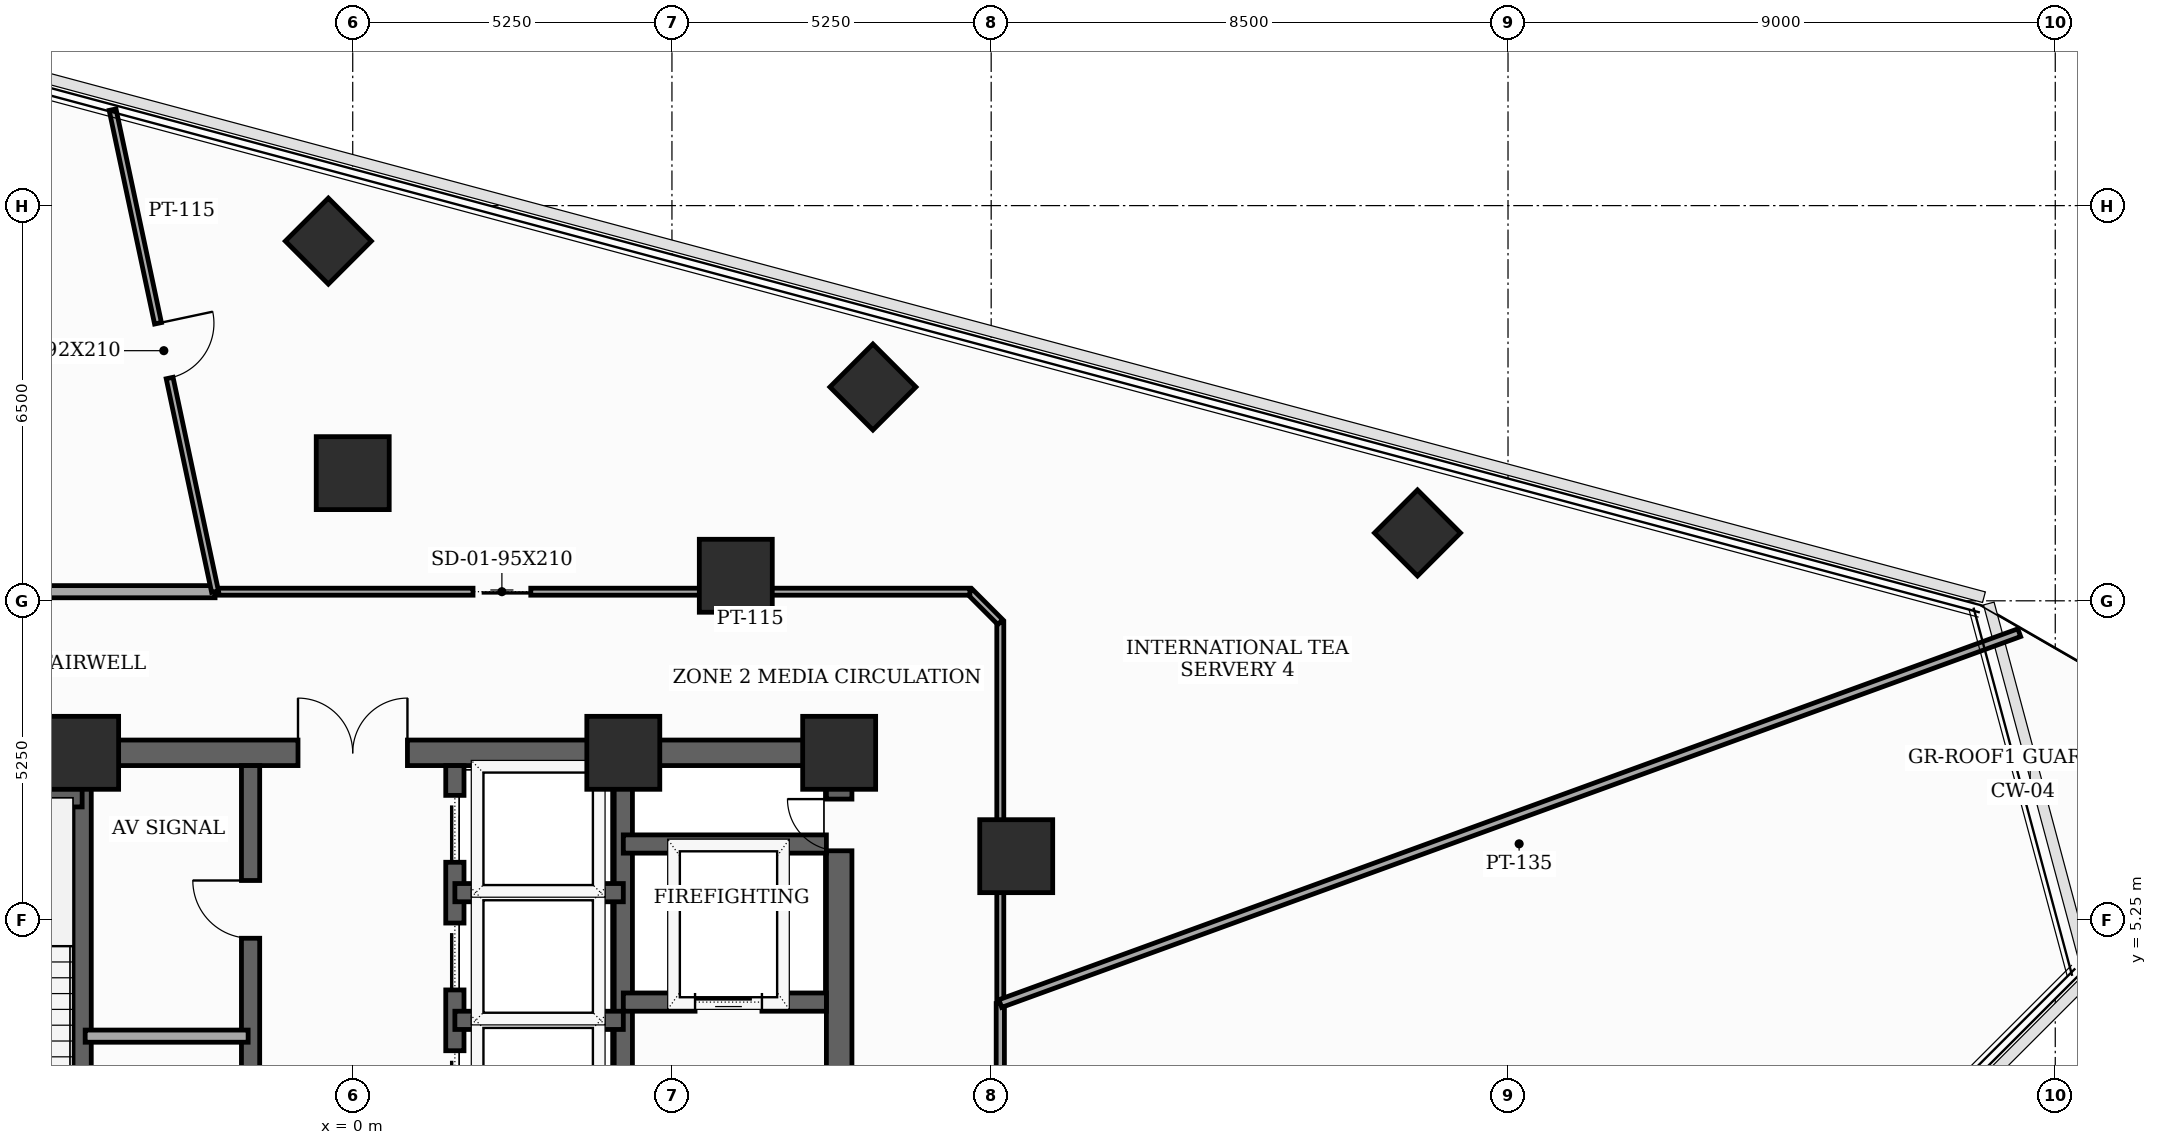
"""IFC4 building model, lengths in metres.
Left out: names, types, materials, properties, quantities, classifications, styles, units other than length and angle.
Written with IfcOpenShell. Run it as: python <this file> out.ifc"""

import sys

from ifc_helpers import new_model, si_unit, direction, frame, frame_2d, origin, origin_2d, place, context, subcontext, project, spatial, rectangle, extrude, element, fill, save


model = new_model("IFC4")
c1 = context("Model", 3, precision=1e-05, world=origin(), true_north=direction((0.0, 1.0)))
c2 = subcontext(c1, "Body", "Model", "MODEL_VIEW")
j1 = project(units=[si_unit("LENGTHUNIT", "METRE"), si_unit("PLANEANGLEUNIT", "RADIAN")], contexts=[c1])
p1 = place(None, origin())
s1 = spatial("IfcSite", under=j1, at=p1, CompositionType="ELEMENT")
p2 = place(p1, origin())
s2 = spatial("IfcBuilding", under=s1, at=p2, CompositionType="ELEMENT")
p3 = place(p2, frame((0.0, 0.0, 202.7)))
s3 = spatial("IfcBuildingStorey", under=s2, at=p3, CompositionType="ELEMENT", Elevation=202.7)
for number, where, z_axis, x_axis in (
    (1, (8.0, 8.0, 0.0), (0.0, 0.0, 1.0), (1.0, 0.0, 0.0)),
    (2, (4.45, 8.0, 0.0), (0.0, 0.0, 1.0), (1.0, 0.0, 0.0)),
    (3, (-4.45, 8.0, 0.0), (0.0, 0.0, 1.0), (1.0, 0.0, 0.0)),
    (4, (10.912, 6.3, 0.0), (0.0, 0.0, 1.0), (1.0, 0.0, 0.0)),
    (5, (6.3, 10.912, 0.0), (0.0, 0.0, 1.0), (1.0, 0.0, 0.0)),
    (6, (0.0, 12.6, 0.0), (0.0, 0.0, 1.0), (1.0, 0.0, 0.0)),
):
    element("IfcColumn", number, at=place(p3, frame(where, z_axis=z_axis, x_axis=x_axis)), inside=s3, PredefinedType="COLUMN", context=c2, shape_type="SweptSolid", body=[
        extrude(rectangle(XDim=1.2, YDim=1.2, at=origin_2d()), origin(), (0.0, 0.0, 1.0), 3.7),
    ])
for number, where, z_axis, x_axis in (
    (7, (17.511, 11.616, 0.0), (0.0, 0.0, 1.0), (0.707, 0.707, 0.0)),
    (8, (8.555, 14.016, 0.0), (0.0, 0.0, 1.0), (0.707, 0.707, 0.0)),
    (9, (-0.401, 16.416, 0.0), (0.0, 0.0, 1.0), (0.707, 0.707, 0.0)),
):
    element("IfcColumn", number, at=place(p3, frame(where, z_axis=z_axis, x_axis=x_axis)), inside=s3, PredefinedType="COLUMN", context=c2, shape_type="SweptSolid", body=[
        extrude(rectangle(XDim=1.0, YDim=1.0, at=origin_2d()), origin(), (0.0, 0.0, 1.0), 3.7),
    ])
p4 = place(p3, frame((8.0, -8.0, 0.0), z_axis=(0.0, 0.0, 1.0), x_axis=(0.0, 1.0, 0.0)))
e10 = element("IfcWall", 10, at=p4, inside=s3, PredefinedType="SHEAR", context=c2, shape_type="SweptSolid", body=[
    extrude(rectangle(XDim=16.0, YDim=0.42, at=frame_2d((8.0, 0.0))), origin(), (0.0, 0.0, 1.0), 3.5),
])
p5 = place(p4, frame((9.6, 0.0, 0.0)))
e11 = element("IfcOpeningElement", 11, at=p5, cuts=e10, PredefinedType="OPENING", context=c2, shape_type="SweptSolid", body=[
    extrude(rectangle(XDim=1.05, YDim=2.15, at=frame_2d((0.525, 1.075))), frame((0.0, 0.22, 0.0), z_axis=(0.0, -1.0, 0.0), x_axis=(1.0, 0.0, 0.0)), (0.0, 0.0, 1.0), 0.44),
])
p6 = place(p4, frame((14.389, 0.0, 0.0)))
e12 = element("IfcOpeningElement", 12, at=p6, cuts=e10, PredefinedType="OPENING", context=c2, shape_type="SweptSolid", body=[
    extrude(rectangle(XDim=0.85, YDim=2.02, at=frame_2d((0.425, 1.01))), frame((0.0, 0.22, 0.0), z_axis=(0.0, -1.0, 0.0), x_axis=(1.0, 0.0, 0.0)), (0.0, 0.0, 1.0), 0.44),
])
p7 = place(p3, frame((-8.0, 8.0, 0.0), z_axis=(0.0, 0.0, 1.0), x_axis=(1.0, 0.0, 0.0)))
e13 = element("IfcWall", 13, at=p7, inside=s3, PredefinedType="SHEAR", context=c2, shape_type="SweptSolid", body=[
    extrude(rectangle(XDim=16.0, YDim=0.42, at=frame_2d((8.0, 0.0))), origin(), (0.0, 0.0, 1.0), 3.5),
])
p8 = place(p7, frame((7.1, 0.0, 0.0)))
e14 = element("IfcOpeningElement", 14, at=p8, cuts=e13, PredefinedType="OPENING", context=c2, shape_type="SweptSolid", body=[
    extrude(rectangle(XDim=1.8, YDim=2.15, at=frame_2d((0.9, 1.075))), frame((0.0, 0.22, 0.0), z_axis=(0.0, -1.0, 0.0), x_axis=(1.0, 0.0, 0.0)), (0.0, 0.0, 1.0), 0.44),
])
for number, where, z_axis, x_axis in (
    (15, (-4.45, -7.79, 0.0), (0.0, 0.0, 1.0), (0.0, 1.0, 0.0)),
    (16, (4.45, -7.79, 0.0), (0.0, 0.0, 1.0), (0.0, 1.0, 0.0)),
):
    element("IfcWall", number, at=place(p3, frame(where, z_axis=z_axis, x_axis=x_axis)), inside=s3, PredefinedType="SHEAR", context=c2, shape_type="SweptSolid", body=[
        extrude(rectangle(XDim=15.58, YDim=0.3, at=frame_2d((7.79, 0.0))), origin(), (0.0, 0.0, 1.0), 3.5),
    ])
p9 = place(p3, frame((-7.79, 7.26, 0.0), z_axis=(0.0, 0.0, 1.0), x_axis=(1.0, 0.0, 0.0)))
e17 = element("IfcWall", 17, at=p9, inside=s3, PredefinedType="SHEAR", context=c2, shape_type="SweptSolid", body=[
    extrude(rectangle(XDim=3.34, YDim=0.3, at=frame_2d((1.67, 0.0))), origin(), (0.0, 0.0, 1.0), 3.5),
])
p10 = place(p3, frame((4.45, 3.9, 0.0), z_axis=(0.0, 0.0, 1.0), x_axis=(1.0, 0.0, 0.0)))
e18 = element("IfcWall", 18, at=p10, inside=s3, PredefinedType="SHEAR", context=c2, shape_type="SweptSolid", body=[
    extrude(rectangle(XDim=3.34, YDim=0.3, at=frame_2d((1.67, 0.0))), origin(), (0.0, 0.0, 1.0), 3.5),
])
p11 = place(p10, frame((1.18, 0.0, 0.0)))
e19 = element("IfcOpeningElement", 19, at=p11, cuts=e18, PredefinedType="OPENING", context=c2, shape_type="SweptSolid", body=[
    extrude(rectangle(XDim=1.1, YDim=2.1, at=frame_2d((0.55, 1.05))), frame((0.0, 0.16, 0.0), z_axis=(0.0, -1.0, 0.0), x_axis=(1.0, 0.0, 0.0)), (0.0, 0.0, 1.0), 0.32),
])
p12 = place(p3, frame((4.45, 6.5, 0.0), z_axis=(0.0, 0.0, 1.0), x_axis=(1.0, 0.0, 0.0)))
e20 = element("IfcWall", 20, at=p12, inside=s3, PredefinedType="SHEAR", context=c2, shape_type="SweptSolid", body=[
    extrude(rectangle(XDim=3.34, YDim=0.3, at=frame_2d((1.67, 0.0))), origin(), (0.0, 0.0, 1.0), 3.5),
])
p13 = place(p3, frame((-1.68, -4.85, 0.0), z_axis=(0.0, 0.0, 1.0), x_axis=(0.0, 1.0, 0.0)))
e21 = element("IfcWall", 21, at=p13, inside=s3, PredefinedType="SHEAR", context=c2, shape_type="SweptSolid", body=[
    extrude(rectangle(XDim=12.64, YDim=0.3, at=frame_2d((6.32, 0.0))), origin(), (0.0, 0.0, 1.0), 3.5),
])
p14 = place(p13, frame((3.5, 0.0, 0.0)))
e22 = element("IfcOpeningElement", 22, at=p14, cuts=e21, PredefinedType="OPENING", context=c2, shape_type="SweptSolid", body=[
    extrude(rectangle(XDim=0.95, YDim=2.1, at=frame_2d((0.475, 1.05))), frame((0.0, 0.16, 0.0), z_axis=(0.0, -1.0, 0.0), x_axis=(1.0, 0.0, 0.0)), (0.0, 0.0, 1.0), 0.32),
])
p15 = place(p13, frame((9.8, 0.0, 0.0)))
e23 = element("IfcOpeningElement", 23, at=p15, cuts=e21, PredefinedType="OPENING", context=c2, shape_type="SweptSolid", body=[
    extrude(rectangle(XDim=0.95, YDim=2.1, at=frame_2d((0.475, 1.05))), frame((0.0, 0.16, 0.0), z_axis=(0.0, -1.0, 0.0), x_axis=(1.0, 0.0, 0.0)), (0.0, 0.0, 1.0), 0.32),
])
p16 = place(p3, frame((1.68, -4.85, 0.0), z_axis=(0.0, 0.0, 1.0), x_axis=(0.0, 1.0, 0.0)))
e24 = element("IfcWall", 24, at=p16, inside=s3, PredefinedType="SHEAR", context=c2, shape_type="SweptSolid", body=[
    extrude(rectangle(XDim=12.64, YDim=0.3, at=frame_2d((6.32, 0.0))), origin(), (0.0, 0.0, 1.0), 3.5),
])
p17 = place(p16, frame((0.55, 0.0, 0.0)))
e25 = element("IfcOpeningElement", 25, at=p17, cuts=e24, PredefinedType="OPENING", context=c2, shape_type="SweptSolid", body=[
    extrude(rectangle(XDim=1.1, YDim=2.1, at=frame_2d((0.55, 1.05))), frame((0.0, 0.16, 0.0), z_axis=(0.0, -1.0, 0.0), x_axis=(1.0, 0.0, 0.0)), (0.0, 0.0, 1.0), 0.32),
])
p18 = place(p16, frame((2.65, 0.0, 0.0)))
e26 = element("IfcOpeningElement", 26, at=p18, cuts=e24, PredefinedType="OPENING", context=c2, shape_type="SweptSolid", body=[
    extrude(rectangle(XDim=1.1, YDim=2.1, at=frame_2d((0.55, 1.05))), frame((0.0, 0.16, 0.0), z_axis=(0.0, -1.0, 0.0), x_axis=(1.0, 0.0, 0.0)), (0.0, 0.0, 1.0), 0.32),
])
p19 = place(p16, frame((4.75, 0.0, 0.0)))
e27 = element("IfcOpeningElement", 27, at=p19, cuts=e24, PredefinedType="OPENING", context=c2, shape_type="SweptSolid", body=[
    extrude(rectangle(XDim=1.1, YDim=2.1, at=frame_2d((0.55, 1.05))), frame((0.0, 0.16, 0.0), z_axis=(0.0, -1.0, 0.0), x_axis=(1.0, 0.0, 0.0)), (0.0, 0.0, 1.0), 0.32),
])
p20 = place(p16, frame((6.85, 0.0, 0.0)))
e28 = element("IfcOpeningElement", 28, at=p20, cuts=e24, PredefinedType="OPENING", context=c2, shape_type="SweptSolid", body=[
    extrude(rectangle(XDim=1.1, YDim=2.1, at=frame_2d((0.55, 1.05))), frame((0.0, 0.16, 0.0), z_axis=(0.0, -1.0, 0.0), x_axis=(1.0, 0.0, 0.0)), (0.0, 0.0, 1.0), 0.32),
])
p21 = place(p16, frame((8.95, 0.0, 0.0)))
e29 = element("IfcOpeningElement", 29, at=p21, cuts=e24, PredefinedType="OPENING", context=c2, shape_type="SweptSolid", body=[
    extrude(rectangle(XDim=1.1, YDim=2.1, at=frame_2d((0.55, 1.05))), frame((0.0, 0.16, 0.0), z_axis=(0.0, -1.0, 0.0), x_axis=(1.0, 0.0, 0.0)), (0.0, 0.0, 1.0), 0.32),
])
p22 = place(p16, frame((11.05, 0.0, 0.0)))
e30 = element("IfcOpeningElement", 30, at=p22, cuts=e24, PredefinedType="OPENING", context=c2, shape_type="SweptSolid", body=[
    extrude(rectangle(XDim=1.1, YDim=2.1, at=frame_2d((0.55, 1.05))), frame((0.0, 0.16, 0.0), z_axis=(0.0, -1.0, 0.0), x_axis=(1.0, 0.0, 0.0)), (0.0, 0.0, 1.0), 0.32),
])
for number, where, z_axis, x_axis in (
    (31, (1.68, 3.6, 0.0), (0.0, 0.0, 1.0), (1.0, 0.0, 0.0)),
    (32, (1.68, 5.7, 0.0), (0.0, 0.0, 1.0), (1.0, 0.0, 0.0)),
):
    element("IfcWall", number, at=place(p3, frame(where, z_axis=z_axis, x_axis=x_axis)), inside=s3, PredefinedType="SHEAR", context=c2, shape_type="SweptSolid", body=[
        extrude(rectangle(XDim=2.77, YDim=0.3, at=frame_2d((1.385, 0.0))), origin(), (0.0, 0.0, 1.0), 3.5),
    ])
p23 = place(p3, frame((-4.4, 3.34, 0.0), z_axis=(0.0, 0.0, 1.0), x_axis=(1.0, 0.0, 0.0)))
e33 = element("IfcWall", 33, at=p23, inside=s3, PredefinedType="SOLIDWALL", context=c2, shape_type="SweptSolid", body=[
    extrude(rectangle(XDim=2.68, YDim=0.2, at=frame_2d((1.34, 0.0))), origin(), (0.0, 0.0, 1.0), 3.5),
])
p24 = place(p3, frame((10.65, -7.738, 0.0), z_axis=(0.0, 0.0, 1.0), x_axis=(0.0, 1.0, 0.0)))
e34 = element("IfcWall", 34, at=p24, inside=s3, PredefinedType="PARTITIONING", context=c2, shape_type="SweptSolid", body=[
    extrude(rectangle(XDim=11.614, YDim=0.135, at=frame_2d((5.807, 0.0))), origin(), (0.0, 0.0, 1.0), 2.885),
])
p25 = place(p24, frame((5.332, 0.0, 0.0)))
e35 = element("IfcOpeningElement", 35, at=p25, cuts=e34, PredefinedType="OPENING", context=c2, shape_type="SweptSolid", body=[
    extrude(rectangle(XDim=0.95, YDim=2.1, at=frame_2d((0.475, 1.05))), frame((0.0, 0.077, 0.0), z_axis=(0.0, -1.0, 0.0), x_axis=(1.0, 0.0, 0.0)), (0.0, 0.0, 1.0), 0.155),
])
p26 = place(p3, frame((10.65, 3.876, 0.0), z_axis=(0.0, 0.0, 1.0), x_axis=(0.0, 1.0, 0.0)))
e36 = element("IfcWall", 36, at=p26, inside=s3, PredefinedType="PARTITIONING", context=c2, shape_type="SweptSolid", body=[
    extrude(rectangle(XDim=6.274, YDim=0.115, at=frame_2d((3.137, 0.0))), origin(), (0.0, 0.0, 1.0), 2.885),
])
p27 = place(p3, frame((10.65, 10.15, 0.0), z_axis=(0.0, 0.0, 1.0), x_axis=(-0.707106781187, 0.707106781187, 0.0)))
e37 = element("IfcWall", 37, at=p27, inside=s3, PredefinedType="PARTITIONING", context=c2, shape_type="SweptSolid", body=[
    extrude(rectangle(XDim=0.707, YDim=0.115, at=frame_2d((0.354, 0.0))), origin(), (0.0, 0.0, 1.0), 3.5),
])
p28 = place(p3, frame((10.15, 10.65, 0.0), z_axis=(0.0, 0.0, 1.0), x_axis=(-1.0, 0.0, 0.0)))
e38 = element("IfcWall", 38, at=p28, inside=s3, PredefinedType="PARTITIONING", context=c2, shape_type="SweptSolid", body=[
    extrude(rectangle(XDim=12.414, YDim=0.115, at=frame_2d((6.207, 0.0))), origin(), (0.0, 0.0, 1.0), 2.885),
])
p29 = place(p28, frame((7.222, 0.0, 0.0)))
e39 = element("IfcOpeningElement", 39, at=p29, cuts=e38, PredefinedType="OPENING", context=c2, shape_type="SweptSolid", body=[
    extrude(rectangle(XDim=0.95, YDim=2.1, at=frame_2d((0.475, 1.05))), frame((0.0, 0.067, 0.0), z_axis=(0.0, -1.0, 0.0), x_axis=(1.0, 0.0, 0.0)), (0.0, 0.0, 1.0), 0.135),
])
p30 = place(p3, frame((-2.264, 10.65, 0.0), z_axis=(0.0, 0.0, 1.0), x_axis=(-1.0, 0.0, 0.0)))
e40 = element("IfcWall", 40, at=p30, inside=s3, PredefinedType="SOLIDWALL", context=c2, shape_type="SweptSolid", body=[
    extrude(rectangle(XDim=7.886, YDim=0.2, at=frame_2d((3.943, 0.0))), origin(), (0.0, 0.0, 1.0), 2.885),
])
p31 = place(p3, frame((27.408, 9.976, 0.0), z_axis=(0.0, 0.0, 1.0), x_axis=(-0.939687855064, -0.342033236756, 0.0)))
e41 = element("IfcWall", 41, at=p31, inside=s3, PredefinedType="PARTITIONING", context=c2, shape_type="SweptSolid", body=[
    extrude(rectangle(XDim=17.833, YDim=0.135, at=frame_2d((8.917, 0.0))), origin(), (0.0, 0.0, 1.0), 2.885),
])
p32 = place(p3, frame((-3.949, 18.578, 0.0), z_axis=(0.0, 0.0, 1.0), x_axis=(0.20795313807, -0.978138789931, 0.0)))
e42 = element("IfcWall", 42, at=p32, inside=s3, PredefinedType="PARTITIONING", context=c2, shape_type="SweptSolid", body=[
    extrude(rectangle(XDim=8.105, YDim=0.115, at=frame_2d((4.053, 0.0))), origin(), (0.0, 0.0, 1.0), 2.885),
])
p33 = place(p32, frame((3.593, 0.0, 0.0)))
e43 = element("IfcOpeningElement", 43, at=p33, cuts=e42, PredefinedType="OPENING", context=c2, shape_type="SweptSolid", body=[
    extrude(rectangle(XDim=0.92, YDim=2.1, at=frame_2d((0.46, 1.05))), frame((0.0, 0.067, 0.0), z_axis=(0.0, -1.0, 0.0), x_axis=(1.0, 0.0, 0.0)), (0.0, 0.0, 1.0), 0.135),
])
p34 = place(p6, origin())
e44 = element("IfcDoor", 44, at=p34, inside=s3, OperationType="SINGLE_SWING_RIGHT", PredefinedType="TRAPDOOR", context=c2, shape_type="SweptSolid", body=[
    extrude(rectangle(XDim=0.85, YDim=2.02, at=frame_2d((0.425, 1.01))), frame((0.0, 0.025, 0.0), z_axis=(0.0, -1.0, 0.0), x_axis=(1.0, 0.0, 0.0)), (0.0, 0.0, 1.0), 0.05),
])
fill(e12, e44)
p35 = place(p8, origin())
e45 = element("IfcDoor", 45, at=p35, inside=s3, OperationType="DOUBLE_DOOR_SINGLE_SWING", PredefinedType="DOOR", context=c2, shape_type="SweptSolid", body=[
    extrude(rectangle(XDim=1.8, YDim=2.15, at=frame_2d((0.9, 1.075))), frame((0.0, 0.025, 0.0), z_axis=(0.0, -1.0, 0.0), x_axis=(1.0, 0.0, 0.0)), (0.0, 0.0, 1.0), 0.05),
])
fill(e14, e45)
p36 = place(p11, origin())
e46 = element("IfcDoor", 46, at=p36, inside=s3, OperationType="SLIDING_TO_LEFT", PredefinedType="DOOR", context=c2, shape_type="SweptSolid", body=[
    extrude(rectangle(XDim=1.1, YDim=2.1, at=frame_2d((0.55, 1.05))), frame((0.0, 0.025, 0.0), z_axis=(0.0, -1.0, 0.0), x_axis=(1.0, 0.0, 0.0)), (0.0, 0.0, 1.0), 0.05),
])
fill(e19, e46)
p37 = place(p15, origin())
e47 = element("IfcDoor", 47, at=p37, inside=s3, OperationType="SINGLE_SWING_RIGHT", PredefinedType="DOOR", context=c2, shape_type="SweptSolid", body=[
    extrude(rectangle(XDim=0.95, YDim=2.1, at=frame_2d((0.475, 1.05))), frame((0.0, 0.025, 0.0), z_axis=(0.0, -1.0, 0.0), x_axis=(1.0, 0.0, 0.0)), (0.0, 0.0, 1.0), 0.05),
])
fill(e23, e47)
p38 = place(p20, origin())
e48 = element("IfcDoor", 48, at=p38, inside=s3, OperationType="SLIDING_TO_LEFT", PredefinedType="DOOR", context=c2, shape_type="SweptSolid", body=[
    extrude(rectangle(XDim=1.1, YDim=2.1, at=frame_2d((0.55, 1.05))), frame((0.0, 0.025, 0.0), z_axis=(0.0, -1.0, 0.0), x_axis=(1.0, 0.0, 0.0)), (0.0, 0.0, 1.0), 0.05),
])
fill(e28, e48)
p39 = place(p21, origin())
e49 = element("IfcDoor", 49, at=p39, inside=s3, OperationType="SLIDING_TO_LEFT", PredefinedType="DOOR", context=c2, shape_type="SweptSolid", body=[
    extrude(rectangle(XDim=1.1, YDim=2.1, at=frame_2d((0.55, 1.05))), frame((0.0, 0.025, 0.0), z_axis=(0.0, -1.0, 0.0), x_axis=(1.0, 0.0, 0.0)), (0.0, 0.0, 1.0), 0.05),
])
fill(e29, e49)
p40 = place(p22, origin())
e50 = element("IfcDoor", 50, at=p40, inside=s3, OperationType="SLIDING_TO_LEFT", PredefinedType="DOOR", context=c2, shape_type="SweptSolid", body=[
    extrude(rectangle(XDim=1.1, YDim=2.1, at=frame_2d((0.55, 1.05))), frame((0.0, 0.025, 0.0), z_axis=(0.0, -1.0, 0.0), x_axis=(1.0, 0.0, 0.0)), (0.0, 0.0, 1.0), 0.05),
])
fill(e30, e50)
p41 = place(p29, origin())
e51 = element("IfcDoor", 51, at=p41, inside=s3, OperationType="SLIDING_TO_LEFT", PredefinedType="DOOR", context=c2, shape_type="SweptSolid", body=[
    extrude(rectangle(XDim=0.95, YDim=2.1, at=frame_2d((0.475, 1.05))), frame((0.0, 0.025, 0.0), z_axis=(0.0, -1.0, 0.0), x_axis=(1.0, 0.0, 0.0)), (0.0, 0.0, 1.0), 0.05),
])
fill(e39, e51)
p42 = place(p33, origin())
e52 = element("IfcDoor", 52, at=p42, inside=s3, OperationType="SINGLE_SWING_LEFT", PredefinedType="DOOR", context=c2, shape_type="SweptSolid", body=[
    extrude(rectangle(XDim=0.92, YDim=2.1, at=frame_2d((0.46, 1.05))), frame((0.0, 0.025, 0.0), z_axis=(0.0, -1.0, 0.0), x_axis=(1.0, 0.0, 0.0)), (0.0, 0.0, 1.0), 0.05),
])
fill(e43, e52)
save(model, sys.argv[1])
